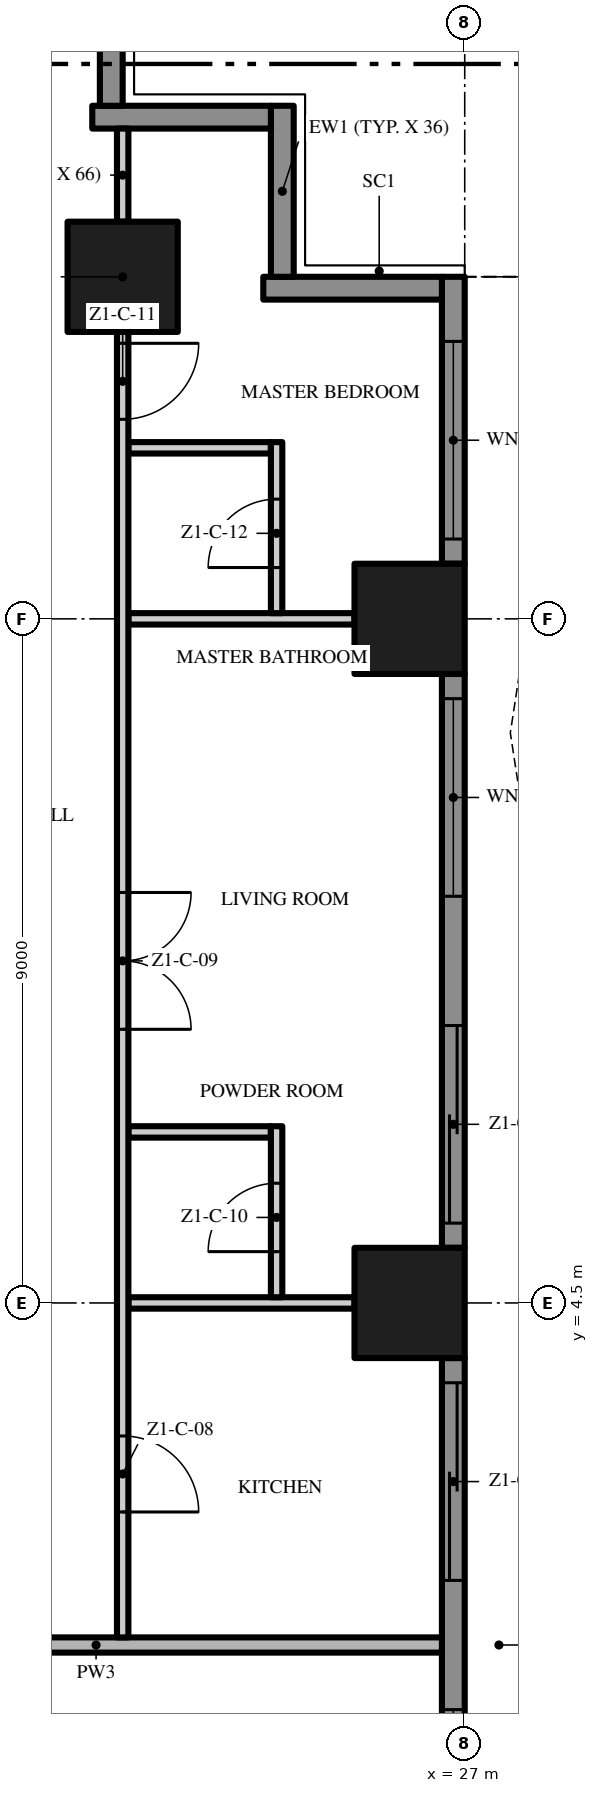
"""IFC4 building model, lengths in metres.
Left out: names, types, materials, properties, quantities, classifications, styles, units other than length and angle.
Written with IfcOpenShell. Run it as: python <this file> out.ifc"""

import sys

from ifc_helpers import new_model, si_unit, direction, frame, frame_2d, origin, origin_2d, place, context, subcontext, project, spatial, polyline, rectangle, outline, extrude, element, fill, save


model = new_model("IFC4")
c1 = context("Model", 3, precision=1e-05, world=origin(), true_north=direction((0.0, 1.0)))
c2 = subcontext(c1, "Body", "Model", "MODEL_VIEW")
j1 = project(units=[si_unit("LENGTHUNIT", "METRE"), si_unit("PLANEANGLEUNIT", "RADIAN")], contexts=[c1])
p1 = place(None, origin())
s1 = spatial("IfcSite", under=j1, at=p1, CompositionType="ELEMENT")
p2 = place(p1, origin())
s2 = spatial("IfcBuilding", under=s1, at=p2, CompositionType="ELEMENT")
p3 = place(p2, frame((0.0, 0.0, 37.8)))
s3 = spatial("IfcBuildingStorey", under=s2, at=p3, CompositionType="ELEMENT", Elevation=37.8)
for number, where, z_axis, x_axis in (
    (1, (26.275, 13.5, 0.0), (0.0, 0.0, 1.0), (1.0, 0.0, 0.0)),
    (2, (22.5, 18.0, 0.0), (0.0, 0.0, 1.0), (1.0, 0.0, 0.0)),
    (3, (26.275, 4.5, 0.0), (0.0, 0.0, 1.0), (1.0, 0.0, 0.0)),
):
    element("IfcColumn", number, at=place(p3, frame(where, z_axis=z_axis, x_axis=x_axis)), inside=s3, PredefinedType="COLUMN", context=c2, shape_type="SweptSolid", body=[
        extrude(rectangle(XDim=1.45, YDim=1.45, at=origin_2d()), origin(), (0.0, 0.0, 1.0), 3.5),
    ])
p4 = place(p3, frame((26.85, 3.775, 0.0), z_axis=(0.0, 0.0, 1.0), x_axis=(0.0, -1.0, 0.0)))
e4 = element("IfcWall", 4, at=p4, inside=s3, PredefinedType="SOLIDWALL", context=c2, shape_type="SweptSolid", body=[
    extrude(rectangle(XDim=7.55, YDim=0.3, at=frame_2d((3.775, 0.0))), origin(), (0.0, 0.0, 1.0), 3.5),
])
p5 = place(p4, frame((4.625, 0.0, 0.45)))
e5 = element("IfcOpeningElement", 5, at=p5, cuts=e4, PredefinedType="OPENING", context=c2, shape_type="SweptSolid", body=[
    extrude(rectangle(XDim=2.6, YDim=2.65, at=frame_2d((1.3, 1.325))), frame((0.0, 0.16, 0.0), z_axis=(0.0, -1.0, 0.0), x_axis=(1.0, 0.0, 0.0)), (0.0, 0.0, 1.0), 0.32),
])
p6 = place(p4, frame((0.325, 0.0, 0.0)))
e6 = element("IfcOpeningElement", 6, at=p6, cuts=e4, PredefinedType="OPENING", context=c2, shape_type="SweptSolid", body=[
    extrude(rectangle(XDim=2.6, YDim=2.4, at=frame_2d((1.3, 1.2))), frame((0.0, 0.16, 0.0), z_axis=(0.0, -1.0, 0.0), x_axis=(1.0, 0.0, 0.0)), (0.0, 0.0, 1.0), 0.32),
])
p7 = place(p3, frame((26.85, 12.775, 0.0), z_axis=(0.0, 0.0, 1.0), x_axis=(0.0, -1.0, 0.0)))
e7 = element("IfcWall", 7, at=p7, inside=s3, PredefinedType="SOLIDWALL", context=c2, shape_type="SweptSolid", body=[
    extrude(rectangle(XDim=7.55, YDim=0.3, at=frame_2d((3.775, 0.0))), origin(), (0.0, 0.0, 1.0), 3.5),
])
p8 = place(p7, frame((4.625, 0.0, 0.0)))
e8 = element("IfcOpeningElement", 8, at=p8, cuts=e7, PredefinedType="OPENING", context=c2, shape_type="SweptSolid", body=[
    extrude(rectangle(XDim=2.6, YDim=2.4, at=frame_2d((1.3, 1.2))), frame((0.0, 0.16, 0.0), z_axis=(0.0, -1.0, 0.0), x_axis=(1.0, 0.0, 0.0)), (0.0, 0.0, 1.0), 0.32),
])
p9 = place(p7, frame((0.325, 0.0, 0.45)))
e9 = element("IfcOpeningElement", 9, at=p9, cuts=e7, PredefinedType="OPENING", context=c2, shape_type="SweptSolid", body=[
    extrude(rectangle(XDim=2.6, YDim=2.65, at=frame_2d((1.3, 1.325))), frame((0.0, 0.16, 0.0), z_axis=(0.0, -1.0, 0.0), x_axis=(1.0, 0.0, 0.0)), (0.0, 0.0, 1.0), 0.32),
])
p10 = place(p3, frame((26.85, 18.0, 0.0), z_axis=(0.0, 0.0, 1.0), x_axis=(0.0, -1.0, 0.0)))
e10 = element("IfcWall", 10, at=p10, inside=s3, PredefinedType="SOLIDWALL", context=c2, shape_type="SweptSolid", body=[
    extrude(rectangle(XDim=3.775, YDim=0.3, at=frame_2d((1.887, 0.0))), origin(), (0.0, 0.0, 1.0), 3.5),
])
p11 = place(p10, frame((0.85, 0.0, 0.45)))
e11 = element("IfcOpeningElement", 11, at=p11, cuts=e10, PredefinedType="OPENING", context=c2, shape_type="SweptSolid", body=[
    extrude(rectangle(XDim=2.6, YDim=2.65, at=frame_2d((1.3, 1.325))), frame((0.0, 0.16, 0.0), z_axis=(0.0, -1.0, 0.0), x_axis=(1.0, 0.0, 0.0)), (0.0, 0.0, 1.0), 0.32),
])
p12 = place(p3, frame((24.35, 17.85, 0.0), z_axis=(0.0, 0.0, 1.0), x_axis=(1.0, 0.0, 0.0)))
e12 = element("IfcWall", 12, at=p12, inside=s3, PredefinedType="SOLIDWALL", context=c2, shape_type="SweptSolid", body=[
    extrude(rectangle(XDim=2.35, YDim=0.3, at=frame_2d((1.175, 0.0))), origin(), (0.0, 0.0, 1.0), 3.5),
])
p13 = place(p3, frame((24.6, 20.25, 0.0), z_axis=(0.0, 0.0, 1.0), x_axis=(0.0, -1.0, 0.0)))
e13 = element("IfcWall", 13, at=p13, inside=s3, PredefinedType="SOLIDWALL", context=c2, shape_type="SweptSolid", body=[
    extrude(rectangle(XDim=2.25, YDim=0.3, at=frame_2d((1.125, 0.0))), origin(), (0.0, 0.0, 1.0), 3.5),
])
p14 = place(p3, frame((22.1, 20.1, 0.0), z_axis=(0.0, 0.0, 1.0), x_axis=(1.0, 0.0, 0.0)))
e14 = element("IfcWall", 14, at=p14, inside=s3, PredefinedType="SOLIDWALL", context=c2, shape_type="SweptSolid", body=[
    extrude(rectangle(XDim=2.35, YDim=0.3, at=frame_2d((1.175, 0.0))), origin(), (0.0, 0.0, 1.0), 3.5),
])
p15 = place(p3, frame((22.35, 22.5, 0.0), z_axis=(0.0, 0.0, 1.0), x_axis=(0.0, -1.0, 0.0)))
e15 = element("IfcWall", 15, at=p15, inside=s3, PredefinedType="SOLIDWALL", context=c2, shape_type="SweptSolid", body=[
    extrude(rectangle(XDim=2.25, YDim=0.3, at=frame_2d((1.125, 0.0))), origin(), (0.0, 0.0, 1.0), 3.5),
])
p16 = place(p3, origin())
e16 = element("IfcWall", 16, at=p16, inside=s3, PredefinedType="USERDEFINED", context=c2, shape_type="SweptSolid", body=[
    extrude(outline(polyline([(27.6, -18.0), (27.829, -16.5), (28.429, -15.0), (29.171, -13.5), (29.771, -12.0), (30.0, -10.5), (29.771, -9.0), (29.171, -7.5), (28.429, -6.0), (27.829, -4.5), (27.6, -3.0), (27.829, -1.5), (28.429, 0.0), (29.171, 1.5), (29.771, 3.0), (30.0, 4.5), (29.771, 6.0), (29.171, 7.5), (28.429, 9.0), (27.829, 10.5), (27.6, 12.0), (27.829, 13.5), (28.429, 15.0), (29.171, 16.5), (29.771, 18.0), (29.539, 18.093), (28.942, 16.602), (28.201, 15.102), (27.586, 13.566), (27.347, 12.0), (27.586, 10.434), (28.201, 8.898), (28.942, 7.398), (29.528, 5.934), (29.747, 4.5), (29.528, 3.066), (28.942, 1.602), (28.201, 0.102), (27.586, -1.434), (27.347, -3.0), (27.586, -4.566), (28.201, -6.102), (28.942, -7.602), (29.528, -9.066), (29.747, -10.5), (29.528, -11.934), (28.942, -13.398), (28.201, -14.898), (27.586, -16.434), (27.353, -17.962), (27.6, -18.0)])), origin(), (0.0, 0.0, 1.0), 0.9),
])
p17 = place(p3, frame((17.6, 0.0, 0.0), z_axis=(0.0, 0.0, 1.0), x_axis=(1.0, 0.0, 0.0)))
e17 = element("IfcWall", 17, at=p17, inside=s3, PredefinedType="PARTITIONING", context=c2, shape_type="SweptSolid", body=[
    extrude(rectangle(XDim=9.1, YDim=0.2, at=frame_2d((4.55, 0.0))), origin(), (0.0, 0.0, 1.0), 3.5),
])
p18 = place(p3, frame((22.575, 4.5, 0.0), z_axis=(0.0, 0.0, 1.0), x_axis=(1.0, 0.0, 0.0)))
e18 = element("IfcWall", 18, at=p18, inside=s3, PredefinedType="PARTITIONING", context=c2, shape_type="SweptSolid", body=[
    extrude(rectangle(XDim=2.975, YDim=0.15, at=frame_2d((1.488, 0.0))), origin(), (0.0, 0.0, 1.0), 3.5),
])
p19 = place(p3, frame((22.575, 6.75, 0.0), z_axis=(0.0, 0.0, 1.0), x_axis=(1.0, 0.0, 0.0)))
e19 = element("IfcWall", 19, at=p19, inside=s3, PredefinedType="PARTITIONING", context=c2, shape_type="SweptSolid", body=[
    extrude(rectangle(XDim=1.875, YDim=0.15, at=frame_2d((0.938, 0.0))), origin(), (0.0, 0.0, 1.0), 3.5),
])
p20 = place(p3, frame((22.575, 13.5, 0.0), z_axis=(0.0, 0.0, 1.0), x_axis=(1.0, 0.0, 0.0)))
e20 = element("IfcWall", 20, at=p20, inside=s3, PredefinedType="PARTITIONING", context=c2, shape_type="SweptSolid", body=[
    extrude(rectangle(XDim=2.975, YDim=0.15, at=frame_2d((1.488, 0.0))), origin(), (0.0, 0.0, 1.0), 3.5),
])
p21 = place(p3, frame((22.575, 15.75, 0.0), z_axis=(0.0, 0.0, 1.0), x_axis=(1.0, 0.0, 0.0)))
e21 = element("IfcWall", 21, at=p21, inside=s3, PredefinedType="PARTITIONING", context=c2, shape_type="SweptSolid", body=[
    extrude(rectangle(XDim=1.875, YDim=0.15, at=frame_2d((0.938, 0.0))), origin(), (0.0, 0.0, 1.0), 3.5),
])
p22 = place(p3, frame((22.5, 17.275, 0.0), z_axis=(0.0, 0.0, 1.0), x_axis=(0.0, -1.0, 0.0)))
e22 = element("IfcWall", 22, at=p22, inside=s3, PredefinedType="PARTITIONING", context=c2, shape_type="SweptSolid", body=[
    extrude(rectangle(XDim=17.175, YDim=0.15, at=frame_2d((8.588, 0.0))), origin(), (0.0, 0.0, 1.0), 3.5),
])
p23 = place(p22, frame((14.525, 0.0, 0.0)))
e23 = element("IfcOpeningElement", 23, at=p23, cuts=e22, PredefinedType="OPENING", context=c2, shape_type="SweptSolid", body=[
    extrude(rectangle(XDim=1.0, YDim=2.4, at=frame_2d((0.5, 1.2))), frame((0.0, 0.085, 0.0), z_axis=(0.0, -1.0, 0.0), x_axis=(1.0, 0.0, 0.0)), (0.0, 0.0, 1.0), 0.17),
])
p24 = place(p22, frame((7.375, 0.0, 0.0)))
e24 = element("IfcOpeningElement", 24, at=p24, cuts=e22, PredefinedType="OPENING", context=c2, shape_type="SweptSolid", body=[
    extrude(rectangle(XDim=1.8, YDim=2.4, at=frame_2d((0.9, 1.2))), frame((0.0, 0.085, 0.0), z_axis=(0.0, -1.0, 0.0), x_axis=(1.0, 0.0, 0.0)), (0.0, 0.0, 1.0), 0.17),
])
p25 = place(p22, frame((0.15, 0.0, 0.0)))
e25 = element("IfcOpeningElement", 25, at=p25, cuts=e22, PredefinedType="OPENING", context=c2, shape_type="SweptSolid", body=[
    extrude(rectangle(XDim=1.0, YDim=2.4, at=frame_2d((0.5, 1.2))), frame((0.0, 0.085, 0.0), z_axis=(0.0, -1.0, 0.0), x_axis=(1.0, 0.0, 0.0)), (0.0, 0.0, 1.0), 0.17),
])
p26 = place(p3, frame((22.5, 18.725, 0.0), z_axis=(0.0, 0.0, 1.0), x_axis=(0.0, 1.0, 0.0)))
e26 = element("IfcWall", 26, at=p26, inside=s3, PredefinedType="PARTITIONING", context=c2, shape_type="SweptSolid", body=[
    extrude(rectangle(XDim=1.225, YDim=0.15, at=frame_2d((0.613, 0.0))), origin(), (0.0, 0.0, 1.0), 3.5),
])
p27 = place(p3, frame((24.525, 4.575, 0.0), z_axis=(0.0, 0.0, 1.0), x_axis=(0.0, 1.0, 0.0)))
e27 = element("IfcWall", 27, at=p27, inside=s3, PredefinedType="PARTITIONING", context=c2, shape_type="SweptSolid", body=[
    extrude(rectangle(XDim=2.25, YDim=0.15, at=frame_2d((1.125, 0.0))), origin(), (0.0, 0.0, 1.0), 3.5),
])
p28 = place(p27, frame((0.6, 0.0, 0.0)))
e28 = element("IfcOpeningElement", 28, at=p28, cuts=e27, PredefinedType="OPENING", context=c2, shape_type="SweptSolid", body=[
    extrude(rectangle(XDim=0.9, YDim=2.1, at=frame_2d((0.45, 1.05))), frame((0.0, 0.085, 0.0), z_axis=(0.0, -1.0, 0.0), x_axis=(1.0, 0.0, 0.0)), (0.0, 0.0, 1.0), 0.17),
])
p29 = place(p3, frame((24.525, 13.575, 0.0), z_axis=(0.0, 0.0, 1.0), x_axis=(0.0, 1.0, 0.0)))
e29 = element("IfcWall", 29, at=p29, inside=s3, PredefinedType="PARTITIONING", context=c2, shape_type="SweptSolid", body=[
    extrude(rectangle(XDim=2.25, YDim=0.15, at=frame_2d((1.125, 0.0))), origin(), (0.0, 0.0, 1.0), 3.5),
])
p30 = place(p29, frame((0.6, 0.0, 0.0)))
e30 = element("IfcOpeningElement", 30, at=p30, cuts=e29, PredefinedType="OPENING", context=c2, shape_type="SweptSolid", body=[
    extrude(rectangle(XDim=0.9, YDim=2.1, at=frame_2d((0.45, 1.05))), frame((0.0, 0.085, 0.0), z_axis=(0.0, -1.0, 0.0), x_axis=(1.0, 0.0, 0.0)), (0.0, 0.0, 1.0), 0.17),
])
p31 = place(p5, origin())
e31 = element("IfcWindow", 31, at=p31, inside=s3, PartitioningType="SINGLE_PANEL", PredefinedType="WINDOW", context=c2, shape_type="SweptSolid", body=[
    extrude(rectangle(XDim=2.6, YDim=2.65, at=frame_2d((1.3, 1.325))), frame((0.0, 0.03, 0.0), z_axis=(0.0, -1.0, 0.0), x_axis=(1.0, 0.0, 0.0)), (0.0, 0.0, 1.0), 0.06),
])
fill(e5, e31)
p32 = place(p6, origin())
e32 = element("IfcDoor", 32, at=p32, inside=s3, OperationType="SINGLE_SWING_LEFT", PredefinedType="DOOR", context=c2, shape_type="SweptSolid", body=[
    extrude(rectangle(XDim=2.6, YDim=2.4, at=frame_2d((1.3, 1.2))), frame((0.0, 0.025, 0.0), z_axis=(0.0, -1.0, 0.0), x_axis=(1.0, 0.0, 0.0)), (0.0, 0.0, 1.0), 0.05),
])
fill(e6, e32)
p33 = place(p8, origin())
e33 = element("IfcDoor", 33, at=p33, inside=s3, OperationType="SINGLE_SWING_LEFT", PredefinedType="DOOR", context=c2, shape_type="SweptSolid", body=[
    extrude(rectangle(XDim=2.6, YDim=2.4, at=frame_2d((1.3, 1.2))), frame((0.0, 0.025, 0.0), z_axis=(0.0, -1.0, 0.0), x_axis=(1.0, 0.0, 0.0)), (0.0, 0.0, 1.0), 0.05),
])
fill(e8, e33)
p34 = place(p9, origin())
e34 = element("IfcWindow", 34, at=p34, inside=s3, PartitioningType="SINGLE_PANEL", PredefinedType="WINDOW", context=c2, shape_type="SweptSolid", body=[
    extrude(rectangle(XDim=2.6, YDim=2.65, at=frame_2d((1.3, 1.325))), frame((0.0, 0.03, 0.0), z_axis=(0.0, -1.0, 0.0), x_axis=(1.0, 0.0, 0.0)), (0.0, 0.0, 1.0), 0.06),
])
fill(e9, e34)
p35 = place(p11, origin())
e35 = element("IfcWindow", 35, at=p35, inside=s3, PartitioningType="SINGLE_PANEL", PredefinedType="WINDOW", context=c2, shape_type="SweptSolid", body=[
    extrude(rectangle(XDim=2.6, YDim=2.65, at=frame_2d((1.3, 1.325))), frame((0.0, 0.03, 0.0), z_axis=(0.0, -1.0, 0.0), x_axis=(1.0, 0.0, 0.0)), (0.0, 0.0, 1.0), 0.06),
])
fill(e11, e35)
p36 = place(p23, origin())
e36 = element("IfcDoor", 36, at=p36, inside=s3, OperationType="SINGLE_SWING_RIGHT", PredefinedType="DOOR", context=c2, shape_type="SweptSolid", body=[
    extrude(rectangle(XDim=1.0, YDim=2.4, at=frame_2d((0.5, 1.2))), frame((0.0, 0.025, 0.0), z_axis=(0.0, -1.0, 0.0), x_axis=(1.0, 0.0, 0.0)), (0.0, 0.0, 1.0), 0.05),
])
fill(e23, e36)
p37 = place(p24, origin())
e37 = element("IfcDoor", 37, at=p37, inside=s3, OperationType="DOUBLE_DOOR_SINGLE_SWING", PredefinedType="DOOR", context=c2, shape_type="SweptSolid", body=[
    extrude(rectangle(XDim=1.8, YDim=2.4, at=frame_2d((0.9, 1.2))), frame((0.0, 0.025, 0.0), z_axis=(0.0, -1.0, 0.0), x_axis=(1.0, 0.0, 0.0)), (0.0, 0.0, 1.0), 0.05),
])
fill(e24, e37)
p38 = place(p28, origin())
e38 = element("IfcDoor", 38, at=p38, inside=s3, OperationType="SINGLE_SWING_LEFT", PredefinedType="DOOR", context=c2, shape_type="SweptSolid", body=[
    extrude(rectangle(XDim=0.9, YDim=2.1, at=frame_2d((0.45, 1.05))), frame((0.0, 0.025, 0.0), z_axis=(0.0, -1.0, 0.0), x_axis=(1.0, 0.0, 0.0)), (0.0, 0.0, 1.0), 0.05),
])
fill(e28, e38)
p39 = place(p25, origin())
e39 = element("IfcDoor", 39, at=p39, inside=s3, OperationType="SINGLE_SWING_LEFT", PredefinedType="DOOR", context=c2, shape_type="SweptSolid", body=[
    extrude(rectangle(XDim=1.0, YDim=2.4, at=frame_2d((0.5, 1.2))), frame((0.0, 0.025, 0.0), z_axis=(0.0, -1.0, 0.0), x_axis=(1.0, 0.0, 0.0)), (0.0, 0.0, 1.0), 0.05),
])
fill(e25, e39)
p40 = place(p30, origin())
e40 = element("IfcDoor", 40, at=p40, inside=s3, OperationType="SINGLE_SWING_LEFT", PredefinedType="DOOR", context=c2, shape_type="SweptSolid", body=[
    extrude(rectangle(XDim=0.9, YDim=2.1, at=frame_2d((0.45, 1.05))), frame((0.0, 0.025, 0.0), z_axis=(0.0, -1.0, 0.0), x_axis=(1.0, 0.0, 0.0)), (0.0, 0.0, 1.0), 0.05),
])
fill(e30, e40)
save(model, sys.argv[1])
